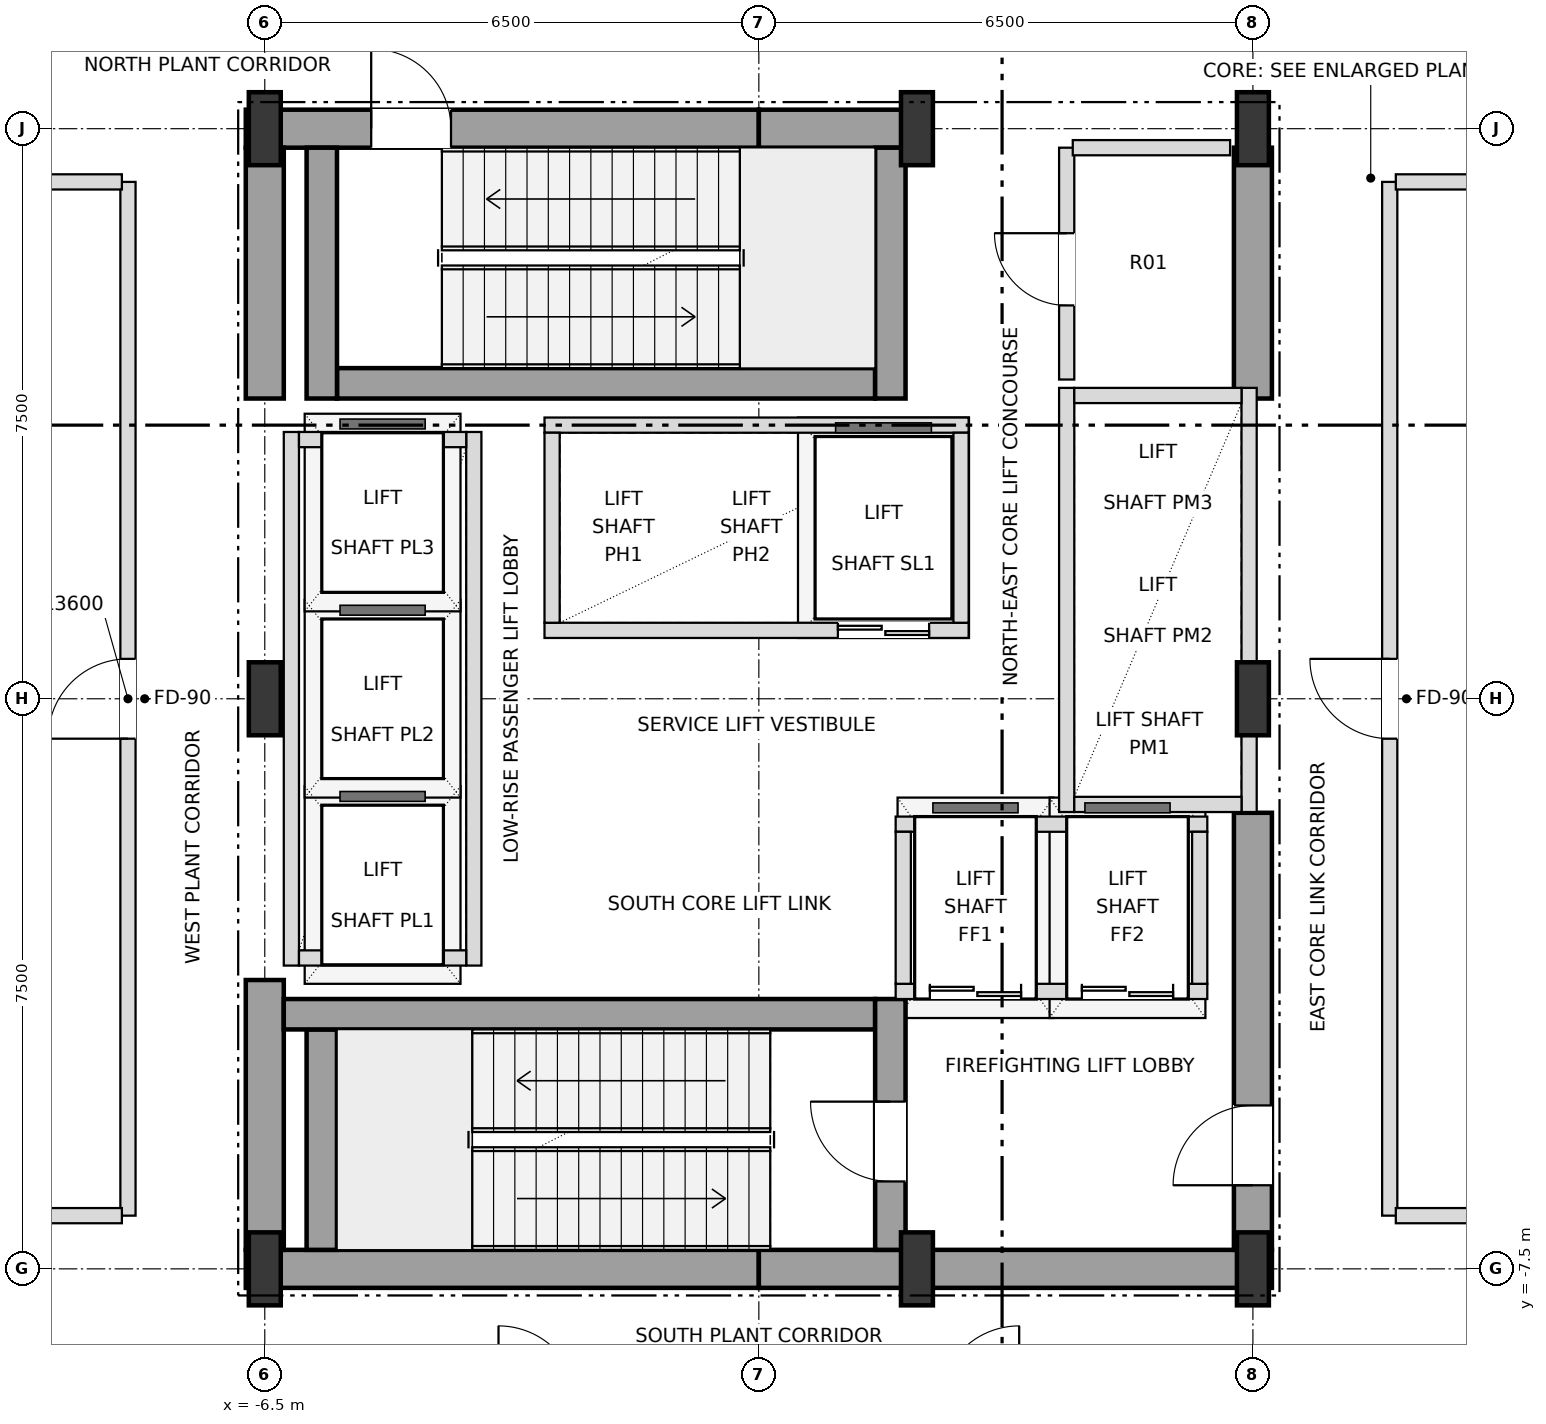
"""IFC4 building model, lengths in metres.
Left out: names, types, materials, properties, quantities, classifications, styles, units other than length and angle.
Written with IfcOpenShell. Run it as: python <this file> out.ifc"""

import sys

from ifc_helpers import new_model, si_unit, direction, frame, frame_2d, origin, origin_2d, place, context, subcontext, project, spatial, rectangle, i_section, extrude, element, fill, save


model = new_model("IFC4")
c1 = context("Model", 3, precision=1e-05, world=origin(), true_north=direction((0.0, 1.0)))
c2 = subcontext(c1, "Body", "Model", "MODEL_VIEW")
j1 = project(units=[si_unit("LENGTHUNIT", "METRE"), si_unit("PLANEANGLEUNIT", "RADIAN")], contexts=[c1])
p1 = place(None, origin())
s1 = spatial("IfcSite", under=j1, at=p1, CompositionType="ELEMENT")
p2 = place(p1, origin())
s2 = spatial("IfcBuilding", under=s1, at=p2, CompositionType="ELEMENT")
p3 = place(p2, frame((0.0, 0.0, 93.6)))
s3 = spatial("IfcBuildingStorey", under=s2, at=p3, CompositionType="ELEMENT", Elevation=93.6)
for number, where, z_axis, x_axis in (
    (1, (-6.5, -7.5, 0.0), (0.0, 0.0, 1.0), (1.0, 0.0, 0.0)),
    (2, (2.08, -7.5, 0.0), (0.0, 0.0, 1.0), (1.0, 0.0, 0.0)),
    (3, (6.5, -7.5, 0.0), (0.0, 0.0, 1.0), (1.0, 0.0, 0.0)),
    (4, (-6.5, 0.0, 0.0), (0.0, 0.0, 1.0), (1.0, 0.0, 0.0)),
    (5, (6.5, 0.0, 0.0), (0.0, 0.0, 1.0), (1.0, 0.0, 0.0)),
    (6, (-6.5, 7.5, 0.0), (0.0, 0.0, 1.0), (1.0, 0.0, 0.0)),
    (7, (2.08, 7.5, 0.0), (0.0, 0.0, 1.0), (1.0, 0.0, 0.0)),
    (8, (6.5, 7.5, 0.0), (0.0, 0.0, 1.0), (1.0, 0.0, 0.0)),
):
    element("IfcColumn", number, at=place(p3, frame(where, z_axis=z_axis, x_axis=x_axis)), inside=s3, PredefinedType="COLUMN", context=c2, shape_type="SweptSolid", body=[
        extrude(i_section(OverallWidth=0.42, OverallDepth=0.96, WebThickness=0.022, FlangeThickness=0.034, at=origin_2d()), origin(), (0.0, 0.0, 1.0), 5.4),
    ])
for number, where, z_axis, x_axis in (
    (9, (-6.75, -7.5, 0.0), (0.0, 0.0, 1.0), (1.0, 0.0, 0.0)),
    (10, (0.0, -7.5, 0.0), (0.0, 0.0, 1.0), (1.0, 0.0, 0.0)),
):
    element("IfcWall", number, at=place(p3, frame(where, z_axis=z_axis, x_axis=x_axis)), inside=s3, PredefinedType="SHEAR", context=c2, shape_type="SweptSolid", body=[
        extrude(rectangle(XDim=6.75, YDim=0.5, at=frame_2d((3.375, 0.0))), origin(), (0.0, 0.0, 1.0), 5.1),
    ])
p4 = place(p3, frame((-6.75, 7.5, 0.0), z_axis=(0.0, 0.0, 1.0), x_axis=(1.0, 0.0, 0.0)))
e11 = element("IfcWall", 11, at=p4, inside=s3, PredefinedType="SHEAR", context=c2, shape_type="SweptSolid", body=[
    extrude(rectangle(XDim=6.75, YDim=0.5, at=frame_2d((3.375, 0.0))), origin(), (0.0, 0.0, 1.0), 5.1),
])
p5 = place(p4, frame((1.65, 0.0, 0.0)))
e12 = element("IfcOpeningElement", 12, at=p5, cuts=e11, PredefinedType="OPENING", context=c2, shape_type="SweptSolid", body=[
    extrude(rectangle(XDim=1.05, YDim=2.15, at=frame_2d((0.525, 1.075))), frame((0.0, 0.26, 0.0), z_axis=(0.0, -1.0, 0.0), x_axis=(1.0, 0.0, 0.0)), (0.0, 0.0, 1.0), 0.52),
])
p6 = place(p3, frame((0.0, 7.5, 0.0), z_axis=(0.0, 0.0, 1.0), x_axis=(1.0, 0.0, 0.0)))
e13 = element("IfcWall", 13, at=p6, inside=s3, PredefinedType="SHEAR", context=c2, shape_type="SweptSolid", body=[
    extrude(rectangle(XDim=2.08, YDim=0.5, at=frame_2d((1.04, 0.0))), origin(), (0.0, 0.0, 1.0), 5.1),
])
p7 = place(p3, frame((-6.5, -7.25, 0.0), z_axis=(0.0, 0.0, 1.0), x_axis=(0.0, 1.0, 0.0)))
e14 = element("IfcWall", 14, at=p7, inside=s3, PredefinedType="SHEAR", context=c2, shape_type="SweptSolid", body=[
    extrude(rectangle(XDim=3.55, YDim=0.5, at=frame_2d((1.775, 0.0))), origin(), (0.0, 0.0, 1.0), 5.1),
])
p8 = place(p3, frame((-6.5, 3.95, 0.0), z_axis=(0.0, 0.0, 1.0), x_axis=(0.0, 1.0, 0.0)))
e15 = element("IfcWall", 15, at=p8, inside=s3, PredefinedType="SHEAR", context=c2, shape_type="SweptSolid", body=[
    extrude(rectangle(XDim=3.3, YDim=0.5, at=frame_2d((1.65, 0.0))), origin(), (0.0, 0.0, 1.0), 5.1),
])
p9 = place(p3, frame((6.5, -7.25, 0.0), z_axis=(0.0, 0.0, 1.0), x_axis=(0.0, 1.0, 0.0)))
e16 = element("IfcWall", 16, at=p9, inside=s3, PredefinedType="SHEAR", context=c2, shape_type="SweptSolid", body=[
    extrude(rectangle(XDim=5.75, YDim=0.5, at=frame_2d((2.875, 0.0))), origin(), (0.0, 0.0, 1.0), 5.1),
])
p10 = place(p9, frame((0.85, 0.0, 0.0)))
e17 = element("IfcOpeningElement", 17, at=p10, cuts=e16, PredefinedType="OPENING", context=c2, shape_type="SweptSolid", body=[
    extrude(rectangle(XDim=1.05, YDim=2.15, at=frame_2d((0.525, 1.075))), frame((0.0, 0.26, 0.0), z_axis=(0.0, -1.0, 0.0), x_axis=(1.0, 0.0, 0.0)), (0.0, 0.0, 1.0), 0.52),
])
p11 = place(p3, frame((6.5, 3.95, 0.0), z_axis=(0.0, 0.0, 1.0), x_axis=(0.0, 1.0, 0.0)))
e18 = element("IfcWall", 18, at=p11, inside=s3, PredefinedType="SHEAR", context=c2, shape_type="SweptSolid", body=[
    extrude(rectangle(XDim=3.3, YDim=0.5, at=frame_2d((1.65, 0.0))), origin(), (0.0, 0.0, 1.0), 5.1),
])
p12 = place(p3, frame((-5.75, -7.25, 0.0), z_axis=(0.0, 0.0, 1.0), x_axis=(0.0, 1.0, 0.0)))
e19 = element("IfcWall", 19, at=p12, inside=s3, PredefinedType="SHEAR", context=c2, shape_type="SweptSolid", body=[
    extrude(rectangle(XDim=2.9, YDim=0.4, at=frame_2d((1.45, 0.0))), origin(), (0.0, 0.0, 1.0), 5.1),
])
p13 = place(p3, frame((-6.25, -4.15, 0.0), z_axis=(0.0, 0.0, 1.0), x_axis=(1.0, 0.0, 0.0)))
e20 = element("IfcWall", 20, at=p13, inside=s3, PredefinedType="SHEAR", context=c2, shape_type="SweptSolid", body=[
    extrude(rectangle(XDim=7.78, YDim=0.4, at=frame_2d((3.89, 0.0))), origin(), (0.0, 0.0, 1.0), 5.1),
])
p14 = place(p3, frame((1.73, -7.25, 0.0), z_axis=(0.0, 0.0, 1.0), x_axis=(0.0, 1.0, 0.0)))
e21 = element("IfcWall", 21, at=p14, inside=s3, PredefinedType="SHEAR", context=c2, shape_type="SweptSolid", body=[
    extrude(rectangle(XDim=3.3, YDim=0.4, at=frame_2d((1.65, 0.0))), origin(), (0.0, 0.0, 1.0), 5.1),
])
p15 = place(p14, frame((0.9, 0.0, 0.0)))
e22 = element("IfcOpeningElement", 22, at=p15, cuts=e21, PredefinedType="OPENING", context=c2, shape_type="SweptSolid", body=[
    extrude(rectangle(XDim=1.05, YDim=2.15, at=frame_2d((0.525, 1.075))), frame((0.0, 0.21, 0.0), z_axis=(0.0, -1.0, 0.0), x_axis=(1.0, 0.0, 0.0)), (0.0, 0.0, 1.0), 0.42),
])
p16 = place(p3, frame((-5.55, 4.15, 0.0), z_axis=(0.0, 0.0, 1.0), x_axis=(1.0, 0.0, 0.0)))
e23 = element("IfcWall", 23, at=p16, inside=s3, PredefinedType="SHEAR", context=c2, shape_type="SweptSolid", body=[
    extrude(rectangle(XDim=7.08, YDim=0.4, at=frame_2d((3.54, 0.0))), origin(), (0.0, 0.0, 1.0), 5.1),
])
for number, where, z_axis, x_axis in (
    (24, (1.73, 3.95, 0.0), (0.0, 0.0, 1.0), (0.0, 1.0, 0.0)),
    (25, (-5.75, 3.95, 0.0), (0.0, 0.0, 1.0), (0.0, 1.0, 0.0)),
):
    element("IfcWall", number, at=place(p3, frame(where, z_axis=z_axis, x_axis=x_axis)), inside=s3, PredefinedType="SHEAR", context=c2, shape_type="SweptSolid", body=[
        extrude(rectangle(XDim=3.3, YDim=0.4, at=frame_2d((1.65, 0.0))), origin(), (0.0, 0.0, 1.0), 5.1),
    ])
for number, where, z_axis, x_axis in (
    (26, (-3.75, -3.51, 0.0), (0.0, 0.0, 1.0), (0.0, 1.0, 0.0)),
    (27, (-6.15, -3.51, 0.0), (0.0, 0.0, 1.0), (0.0, 1.0, 0.0)),
):
    element("IfcWall", number, at=place(p3, frame(where, z_axis=z_axis, x_axis=x_axis)), inside=s3, PredefinedType="SOLIDWALL", context=c2, shape_type="SweptSolid", body=[
        extrude(rectangle(XDim=7.02, YDim=0.2, at=frame_2d((3.51, 0.0))), origin(), (0.0, 0.0, 1.0), 5.1),
    ])
for number, where, z_axis, x_axis in (
    (28, (-6.05, -3.41, 0.0), (0.0, 0.0, 1.0), (1.0, 0.0, 0.0)),
    (29, (-6.05, 3.41, 0.0), (0.0, 0.0, 1.0), (1.0, 0.0, 0.0)),
):
    element("IfcWall", number, at=place(p3, frame(where, z_axis=z_axis, x_axis=x_axis)), inside=s3, PredefinedType="SOLIDWALL", context=c2, shape_type="SweptSolid", body=[
        extrude(rectangle(XDim=2.2, YDim=0.2, at=frame_2d((1.1, 0.0))), origin(), (0.0, 0.0, 1.0), 5.1),
    ])
p17 = place(p3, frame((4.05, -1.49, 0.0), z_axis=(0.0, 0.0, 1.0), x_axis=(0.0, 1.0, 0.0)))
e30 = element("IfcWall", 30, at=p17, inside=s3, PredefinedType="SOLIDWALL", context=c2, shape_type="SweptSolid", body=[
    extrude(rectangle(XDim=5.58, YDim=0.2, at=frame_2d((2.79, 0.0))), origin(), (0.0, 0.0, 1.0), 5.1),
])
p18 = place(p3, frame((6.45, -1.49, 0.0), z_axis=(0.0, 0.0, 1.0), x_axis=(0.0, 1.0, 0.0)))
e31 = element("IfcWall", 31, at=p18, inside=s3, PredefinedType="SOLIDWALL", context=c2, shape_type="SweptSolid", body=[
    extrude(rectangle(XDim=5.58, YDim=0.2, at=frame_2d((2.79, 0.0))), origin(), (0.0, 0.0, 1.0), 4.153),
])
for number, where, z_axis, x_axis in (
    (32, (4.15, -1.39, 0.0), (0.0, 0.0, 1.0), (1.0, 0.0, 0.0)),
    (33, (4.15, 3.99, 0.0), (0.0, 0.0, 1.0), (1.0, 0.0, 0.0)),
):
    element("IfcWall", number, at=place(p3, frame(where, z_axis=z_axis, x_axis=x_axis)), inside=s3, PredefinedType="SOLIDWALL", context=c2, shape_type="SweptSolid", body=[
        extrude(rectangle(XDim=2.2, YDim=0.2, at=frame_2d((1.1, 0.0))), origin(), (0.0, 0.0, 1.0), 5.1),
    ])
p19 = place(p3, frame((-2.82, 0.9, 0.0), z_axis=(0.0, 0.0, 1.0), x_axis=(1.0, 0.0, 0.0)))
e34 = element("IfcWall", 34, at=p19, inside=s3, PredefinedType="SOLIDWALL", context=c2, shape_type="SweptSolid", body=[
    extrude(rectangle(XDim=5.58, YDim=0.2, at=frame_2d((2.79, 0.0))), origin(), (0.0, 0.0, 1.0), 5.1),
])
p20 = place(p19, frame((3.86, 0.0, 0.0)))
e35 = element("IfcOpeningElement", 35, at=p20, cuts=e34, PredefinedType="OPENING", context=c2, shape_type="SweptSolid", body=[
    extrude(rectangle(XDim=1.2, YDim=2.2, at=frame_2d((0.6, 1.1))), frame((0.0, 0.11, 0.0), z_axis=(0.0, -1.0, 0.0), x_axis=(1.0, 0.0, 0.0)), (0.0, 0.0, 1.0), 0.22),
])
p21 = place(p3, frame((-2.82, 3.6, 0.0), z_axis=(0.0, 0.0, 1.0), x_axis=(1.0, 0.0, 0.0)))
e36 = element("IfcWall", 36, at=p21, inside=s3, PredefinedType="SOLIDWALL", context=c2, shape_type="SweptSolid", body=[
    extrude(rectangle(XDim=5.58, YDim=0.2, at=frame_2d((2.79, 0.0))), origin(), (0.0, 0.0, 1.0), 5.1),
])
for number, where, z_axis, x_axis in (
    (37, (-2.72, 1.0, 0.0), (0.0, 0.0, 1.0), (0.0, 1.0, 0.0)),
    (38, (2.66, 1.0, 0.0), (0.0, 0.0, 1.0), (0.0, 1.0, 0.0)),
):
    element("IfcWall", number, at=place(p3, frame(where, z_axis=z_axis, x_axis=x_axis)), inside=s3, PredefinedType="SOLIDWALL", context=c2, shape_type="SweptSolid", body=[
        extrude(rectangle(XDim=2.5, YDim=0.2, at=frame_2d((1.25, 0.0))), origin(), (0.0, 0.0, 1.0), 5.1),
    ])
p22 = place(p3, frame((1.8, -3.85, 0.0), z_axis=(0.0, 0.0, 1.0), x_axis=(1.0, 0.0, 0.0)))
e39 = element("IfcWall", 39, at=p22, inside=s3, PredefinedType="SOLIDWALL", context=c2, shape_type="SweptSolid", body=[
    extrude(rectangle(XDim=4.1, YDim=0.2, at=frame_2d((2.05, 0.0))), origin(), (0.0, 0.0, 1.0), 5.1),
])
p23 = place(p22, frame((0.45, 0.0, 0.0)))
e40 = element("IfcOpeningElement", 40, at=p23, cuts=e39, PredefinedType="OPENING", context=c2, shape_type="SweptSolid", body=[
    extrude(rectangle(XDim=1.2, YDim=2.2, at=frame_2d((0.6, 1.1))), frame((0.0, 0.11, 0.0), z_axis=(0.0, -1.0, 0.0), x_axis=(1.0, 0.0, 0.0)), (0.0, 0.0, 1.0), 0.22),
])
p24 = place(p22, frame((2.45, 0.0, 0.0)))
e41 = element("IfcOpeningElement", 41, at=p24, cuts=e39, PredefinedType="OPENING", context=c2, shape_type="SweptSolid", body=[
    extrude(rectangle(XDim=1.2, YDim=2.2, at=frame_2d((0.6, 1.1))), frame((0.0, 0.11, 0.0), z_axis=(0.0, -1.0, 0.0), x_axis=(1.0, 0.0, 0.0)), (0.0, 0.0, 1.0), 0.22),
])
p25 = place(p3, frame((1.8, -1.65, 0.0), z_axis=(0.0, 0.0, 1.0), x_axis=(1.0, 0.0, 0.0)))
e42 = element("IfcWall", 42, at=p25, inside=s3, PredefinedType="SOLIDWALL", context=c2, shape_type="SweptSolid", body=[
    extrude(rectangle(XDim=4.1, YDim=0.2, at=frame_2d((2.05, 0.0))), origin(), (0.0, 0.0, 1.0), 5.1),
])
for number, where, z_axis, x_axis in (
    (43, (1.9, -3.75, 0.0), (0.0, 0.0, 1.0), (0.0, 1.0, 0.0)),
    (44, (5.8, -3.75, 0.0), (0.0, 0.0, 1.0), (0.0, 1.0, 0.0)),
):
    element("IfcWall", number, at=place(p3, frame(where, z_axis=z_axis, x_axis=x_axis)), inside=s3, PredefinedType="SOLIDWALL", context=c2, shape_type="SweptSolid", body=[
        extrude(rectangle(XDim=2.0, YDim=0.2, at=frame_2d((1.0, 0.0))), origin(), (0.0, 0.0, 1.0), 5.1),
    ])
p26 = place(p3, frame((-8.3, -6.8, 0.0), z_axis=(0.0, 0.0, 1.0), x_axis=(0.0, 1.0, 0.0)))
e45 = element("IfcWall", 45, at=p26, inside=s3, PredefinedType="SOLIDWALL", context=c2, shape_type="SweptSolid", body=[
    extrude(rectangle(XDim=13.6, YDim=0.2, at=frame_2d((6.8, 0.0))), origin(), (0.0, 0.0, 1.0), 5.1),
])
p27 = place(p26, frame((6.275, 0.0, 0.0)))
e46 = element("IfcOpeningElement", 46, at=p27, cuts=e45, PredefinedType="OPENING", context=c2, shape_type="SweptSolid", body=[
    extrude(rectangle(XDim=1.05, YDim=2.15, at=frame_2d((0.525, 1.075))), frame((0.0, 0.11, 0.0), z_axis=(0.0, -1.0, 0.0), x_axis=(1.0, 0.0, 0.0)), (0.0, 0.0, 1.0), 0.22),
])
p28 = place(p3, frame((4.05, 4.2, 0.0), z_axis=(0.0, 0.0, 1.0), x_axis=(0.0, 1.0, 0.0)))
e47 = element("IfcWall", 47, at=p28, inside=s3, PredefinedType="SOLIDWALL", context=c2, shape_type="SweptSolid", body=[
    extrude(rectangle(XDim=3.05, YDim=0.2, at=frame_2d((1.525, 0.0))), origin(), (0.0, 0.0, 1.0), 5.1),
])
p29 = place(p28, frame((0.975, 0.0, 0.0)))
e48 = element("IfcOpeningElement", 48, at=p29, cuts=e47, PredefinedType="OPENING", context=c2, shape_type="SweptSolid", body=[
    extrude(rectangle(XDim=0.95, YDim=2.15, at=frame_2d((0.475, 1.075))), frame((0.0, 0.11, 0.0), z_axis=(0.0, -1.0, 0.0), x_axis=(1.0, 0.0, 0.0)), (0.0, 0.0, 1.0), 0.22),
])
p30 = place(p3, frame((8.3, -6.8, 0.0), z_axis=(0.0, 0.0, 1.0), x_axis=(0.0, 1.0, 0.0)))
e49 = element("IfcWall", 49, at=p30, inside=s3, PredefinedType="SOLIDWALL", context=c2, shape_type="SweptSolid", body=[
    extrude(rectangle(XDim=13.6, YDim=0.2, at=frame_2d((6.8, 0.0))), origin(), (0.0, 0.0, 1.0), 5.1),
])
p31 = place(p30, frame((6.275, 0.0, 0.0)))
e50 = element("IfcOpeningElement", 50, at=p31, cuts=e49, PredefinedType="OPENING", context=c2, shape_type="SweptSolid", body=[
    extrude(rectangle(XDim=1.05, YDim=2.15, at=frame_2d((0.525, 1.075))), frame((0.0, 0.11, 0.0), z_axis=(0.0, -1.0, 0.0), x_axis=(1.0, 0.0, 0.0)), (0.0, 0.0, 1.0), 0.22),
])
for number, where, z_axis, x_axis in (
    (51, (-16.195, -6.8, 0.0), (0.0, 0.0, 1.0), (1.0, 0.0, 0.0)),
    (52, (8.38, -6.8, 0.0), (0.0, 0.0, 1.0), (1.0, 0.0, 0.0)),
    (53, (-16.195, 6.8, 0.0), (0.0, 0.0, 1.0), (1.0, 0.0, 0.0)),
    (54, (8.38, 6.8, 0.0), (0.0, 0.0, 1.0), (1.0, 0.0, 0.0)),
):
    element("IfcWall", number, at=place(p3, frame(where, z_axis=z_axis, x_axis=x_axis)), inside=s3, PredefinedType="SOLIDWALL", context=c2, shape_type="SweptSolid", body=[
        extrude(rectangle(XDim=7.815, YDim=0.2, at=frame_2d((3.908, 0.0))), origin(), (0.0, 0.0, 1.0), 5.1),
    ])
p32 = place(p3, frame((4.13, 7.25, 0.0), z_axis=(0.0, 0.0, 1.0), x_axis=(1.0, 0.0, 0.0)))
e55 = element("IfcWall", 55, at=p32, inside=s3, PredefinedType="SOLIDWALL", context=c2, shape_type="SweptSolid", body=[
    extrude(rectangle(XDim=2.07, YDim=0.2, at=frame_2d((1.035, 0.0))), origin(), (0.0, 0.0, 1.0), 4.153),
])
p33 = place(p10, origin())
e56 = element("IfcDoor", 56, at=p33, inside=s3, OperationType="SINGLE_SWING_LEFT", PredefinedType="DOOR", context=c2, shape_type="SweptSolid", body=[
    extrude(rectangle(XDim=1.05, YDim=2.15, at=frame_2d((0.525, 1.075))), frame((0.0, 0.025, 0.0), z_axis=(0.0, -1.0, 0.0), x_axis=(1.0, 0.0, 0.0)), (0.0, 0.0, 1.0), 0.05),
])
fill(e17, e56)
p34 = place(p15, origin())
e57 = element("IfcDoor", 57, at=p34, inside=s3, OperationType="SINGLE_SWING_RIGHT", PredefinedType="DOOR", context=c2, shape_type="SweptSolid", body=[
    extrude(rectangle(XDim=1.05, YDim=2.15, at=frame_2d((0.525, 1.075))), frame((0.0, 0.025, 0.0), z_axis=(0.0, -1.0, 0.0), x_axis=(1.0, 0.0, 0.0)), (0.0, 0.0, 1.0), 0.05),
])
fill(e22, e57)
p35 = place(p5, origin())
e58 = element("IfcDoor", 58, at=p35, inside=s3, OperationType="SINGLE_SWING_LEFT", PredefinedType="DOOR", context=c2, shape_type="SweptSolid", body=[
    extrude(rectangle(XDim=1.05, YDim=2.15, at=frame_2d((0.525, 1.075))), frame((0.0, 0.025, 0.0), z_axis=(0.0, -1.0, 0.0), x_axis=(1.0, 0.0, 0.0)), (0.0, 0.0, 1.0), 0.05),
])
fill(e12, e58)
p36 = place(p20, origin())
e59 = element("IfcDoor", 59, at=p36, inside=s3, OperationType="DOUBLE_DOOR_SLIDING", PredefinedType="DOOR", context=c2, shape_type="SweptSolid", body=[
    extrude(rectangle(XDim=1.2, YDim=2.2, at=frame_2d((0.6, 1.1))), frame((0.0, 0.025, 0.0), z_axis=(0.0, -1.0, 0.0), x_axis=(1.0, 0.0, 0.0)), (0.0, 0.0, 1.0), 0.05),
])
fill(e35, e59)
p37 = place(p23, origin())
e60 = element("IfcDoor", 60, at=p37, inside=s3, OperationType="DOUBLE_DOOR_SLIDING", PredefinedType="DOOR", context=c2, shape_type="SweptSolid", body=[
    extrude(rectangle(XDim=1.2, YDim=2.2, at=frame_2d((0.6, 1.1))), frame((0.0, 0.025, 0.0), z_axis=(0.0, -1.0, 0.0), x_axis=(1.0, 0.0, 0.0)), (0.0, 0.0, 1.0), 0.05),
])
fill(e40, e60)
p38 = place(p24, origin())
e61 = element("IfcDoor", 61, at=p38, inside=s3, OperationType="DOUBLE_DOOR_SLIDING", PredefinedType="DOOR", context=c2, shape_type="SweptSolid", body=[
    extrude(rectangle(XDim=1.2, YDim=2.2, at=frame_2d((0.6, 1.1))), frame((0.0, 0.025, 0.0), z_axis=(0.0, -1.0, 0.0), x_axis=(1.0, 0.0, 0.0)), (0.0, 0.0, 1.0), 0.05),
])
fill(e41, e61)
p39 = place(p29, origin())
e62 = element("IfcDoor", 62, at=p39, inside=s3, OperationType="SINGLE_SWING_RIGHT", PredefinedType="DOOR", context=c2, shape_type="SweptSolid", body=[
    extrude(rectangle(XDim=0.95, YDim=2.15, at=frame_2d((0.475, 1.075))), frame((0.0, 0.025, 0.0), z_axis=(0.0, -1.0, 0.0), x_axis=(1.0, 0.0, 0.0)), (0.0, 0.0, 1.0), 0.05),
])
fill(e48, e62)
p40 = place(p27, origin())
e63 = element("IfcDoor", 63, at=p40, inside=s3, OperationType="SINGLE_SWING_LEFT", PredefinedType="DOOR", context=c2, shape_type="SweptSolid", body=[
    extrude(rectangle(XDim=1.05, YDim=2.15, at=frame_2d((0.525, 1.075))), frame((0.0, 0.025, 0.0), z_axis=(0.0, -1.0, 0.0), x_axis=(1.0, 0.0, 0.0)), (0.0, 0.0, 1.0), 0.05),
])
fill(e46, e63)
p41 = place(p31, origin())
e64 = element("IfcDoor", 64, at=p41, inside=s3, OperationType="SINGLE_SWING_RIGHT", PredefinedType="DOOR", context=c2, shape_type="SweptSolid", body=[
    extrude(rectangle(XDim=1.05, YDim=2.15, at=frame_2d((0.525, 1.075))), frame((0.0, 0.025, 0.0), z_axis=(0.0, -1.0, 0.0), x_axis=(1.0, 0.0, 0.0)), (0.0, 0.0, 1.0), 0.05),
])
fill(e50, e64)
save(model, sys.argv[1])
